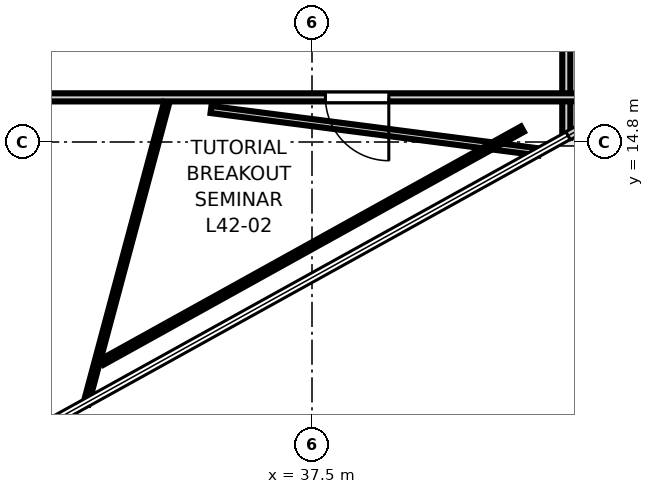
"""IFC4 building model, lengths in metres.
Left out: names, types, materials, properties, quantities, classifications, styles, units other than length and angle.
Written with IfcOpenShell. Run it as: python <this file> out.ifc"""

import sys

from ifc_helpers import new_model, si_unit, direction, frame, frame_2d, origin, place, context, subcontext, project, spatial, rectangle, extrude, element, fill, save


model = new_model("IFC4")
c1 = context("Model", 3, precision=1e-05, world=origin(), true_north=direction((0.0, 1.0)))
c2 = subcontext(c1, "Body", "Model", "MODEL_VIEW")
j1 = project(units=[si_unit("LENGTHUNIT", "METRE"), si_unit("PLANEANGLEUNIT", "RADIAN")], contexts=[c1])
p1 = place(None, origin())
s1 = spatial("IfcSite", under=j1, at=p1, CompositionType="ELEMENT")
p2 = place(p1, origin())
s2 = spatial("IfcBuilding", under=s1, at=p2, CompositionType="ELEMENT")
p3 = place(p2, frame((0.0, 0.0, 166.1)))
s3 = spatial("IfcBuildingStorey", under=s2, at=p3, CompositionType="ELEMENT", Elevation=166.1)
p4 = place(p3, frame((42.519, 17.98, 0.0), z_axis=(0.0, 0.0, 1.0), x_axis=(0.0, -1.0, 0.0)))
e1 = element("IfcWall", 1, at=p4, inside=s3, PredefinedType="PARTITIONING", context=c2, shape_type="SweptSolid", body=[
    extrude(rectangle(XDim=3.095, YDim=0.16, at=frame_2d((1.548, 0.0))), origin(), (0.0, 0.0, 1.0), 2.84),
])
p5 = place(p3, frame((43.94, 15.681, 0.0), z_axis=(0.0, 0.0, 1.0), x_axis=(-1.0, 0.0, 0.0)))
e2 = element("IfcWall", 2, at=p5, inside=s3, PredefinedType="PARTITIONING", context=c2, shape_type="SweptSolid", body=[
    extrude(rectangle(XDim=15.54, YDim=0.16, at=frame_2d((7.77, 0.0))), origin(), (0.0, 0.0, 1.0), 2.84),
])
p6 = place(p5, frame((4.925, 0.0, 0.0)))
e3 = element("IfcOpeningElement", 3, at=p6, cuts=e2, PredefinedType="OPENING", context=c2, shape_type="SweptSolid", body=[
    extrude(rectangle(XDim=1.25, YDim=2.2, at=frame_2d((0.625, 1.1))), frame((0.0, 0.09, 0.0), z_axis=(0.0, -1.0, 0.0), x_axis=(1.0, 0.0, 0.0)), (0.0, 0.0, 1.0), 0.18),
])
p7 = place(p3, frame((34.632, 15.578, 0.0), z_axis=(0.0, 0.0, 1.0), x_axis=(-0.258840546479, -0.965920064756, 0.0)))
e4 = element("IfcWall", 4, at=p7, inside=s3, PredefinedType="PARTITIONING", context=c2, shape_type="SweptSolid", body=[
    extrude(rectangle(XDim=6.153, YDim=0.105, at=frame_2d((3.076, 0.0))), origin(), (0.0, 0.0, 1.0), 2.84),
])
p8 = place(p3, frame((35.506, 15.441, 0.0), z_axis=(0.0, 0.0, 1.0), x_axis=(0.991738600058, -0.128275286609, 0.0)))
e5 = element("IfcWall", 5, at=p8, inside=s3, PredefinedType="PARTITIONING", context=c2, shape_type="SweptSolid", body=[
    extrude(rectangle(XDim=6.524, YDim=0.14, at=frame_2d((3.262, 0.0))), origin(), (0.0, 0.0, 1.0), 2.84),
])
p9 = place(p3, frame((41.652, 15.054, 0.0), z_axis=(0.0, 0.0, 1.0), x_axis=(-0.874683741707, -0.484694080832, 0.0)))
e6 = element("IfcWall", 6, at=p9, inside=s3, PredefinedType="PARTITIONING", context=c2, shape_type="SweptSolid", body=[
    extrude(rectangle(XDim=9.484, YDim=0.12, at=frame_2d((4.742, 0.0))), origin(), (0.0, 0.0, 1.0), 2.84),
])
p10 = place(p6, origin())
e7 = element("IfcDoor", 7, at=p10, inside=s3, OperationType="SINGLE_SWING_LEFT", PredefinedType="DOOR", context=c2, shape_type="SweptSolid", body=[
    extrude(rectangle(XDim=1.25, YDim=2.2, at=frame_2d((0.625, 1.1))), frame((0.0, 0.025, 0.0), z_axis=(0.0, -1.0, 0.0), x_axis=(1.0, 0.0, 0.0)), (0.0, 0.0, 1.0), 0.05),
])
fill(e3, e7)
save(model, sys.argv[1])
